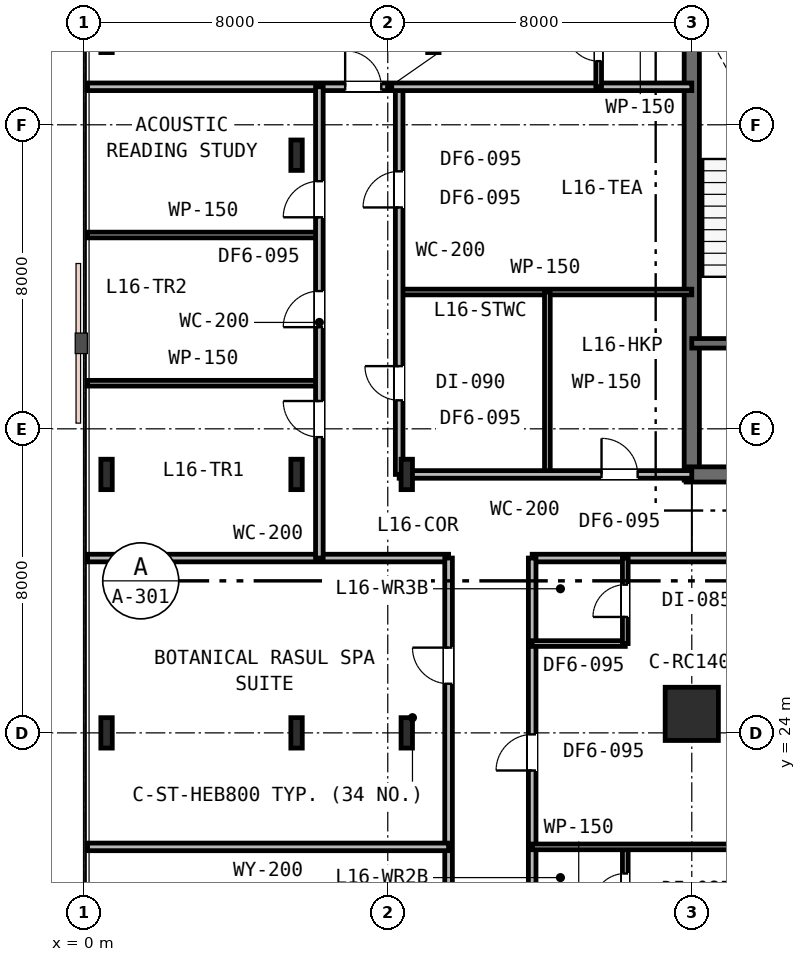
"""IFC4 building model, lengths in metres.
Left out: names, types, materials, properties, quantities, classifications, styles, units other than length and angle.
Written with IfcOpenShell. Run it as: python <this file> out.ifc"""

import sys

from ifc_helpers import new_model, si_unit, direction, frame, frame_2d, origin, origin_2d, place, context, subcontext, project, spatial, rectangle, i_section, extrude, element, fill, save


model = new_model("IFC4")
c1 = context("Model", 3, precision=1e-05, world=origin(), true_north=direction((0.0, 1.0)))
c2 = subcontext(c1, "Body", "Model", "MODEL_VIEW")
j1 = project(units=[si_unit("LENGTHUNIT", "METRE"), si_unit("PLANEANGLEUNIT", "RADIAN")], contexts=[c1])
p1 = place(None, origin())
s1 = spatial("IfcSite", under=j1, at=p1, CompositionType="ELEMENT")
p2 = place(p1, origin())
s2 = spatial("IfcBuilding", under=s1, at=p2, CompositionType="ELEMENT")
p3 = place(p2, frame((0.0, 0.0, 65.4)))
s3 = spatial("IfcBuildingStorey", under=s2, at=p3, CompositionType="ELEMENT", Elevation=65.4)
p4 = place(p3, frame((16.0, 30.65, 0.0), z_axis=(0.0, 0.0, 1.0), x_axis=(0.0, 1.0, 0.0)))
e1 = element("IfcWall", 1, at=p4, inside=s3, PredefinedType="SHEAR", context=c2, shape_type="SweptSolid", body=[
    extrude(rectangle(XDim=12.3, YDim=0.4, at=frame_2d((6.15, 0.0))), origin(), (0.0, 0.0, 1.0), 3.6),
])
p5 = place(p3, frame((15.85, 30.8, 0.0), z_axis=(0.0, 0.0, 1.0), x_axis=(1.0, 0.0, 0.0)))
e2 = element("IfcWall", 2, at=p5, inside=s3, PredefinedType="SHEAR", context=c2, shape_type="SweptSolid", body=[
    extrude(rectangle(XDim=11.2, YDim=0.4, at=frame_2d((5.6, 0.0))), origin(), (0.0, 0.0, 1.0), 3.6),
])
p6 = place(p5, frame((2.45, 0.0, 0.0)))
e3 = element("IfcOpeningElement", 3, at=p6, cuts=e2, PredefinedType="OPENING", context=c2, shape_type="SweptSolid", body=[
    extrude(rectangle(XDim=1.1, YDim=2.15, at=frame_2d((0.55, 1.075))), frame((0.0, 0.21, 0.0), z_axis=(0.0, -1.0, 0.0), x_axis=(1.0, 0.0, 0.0)), (0.0, 0.0, 1.0), 0.42),
])
p7 = place(p3, frame((16.0, 34.25, 0.0), z_axis=(0.0, 0.0, 1.0), x_axis=(1.0, 0.0, 0.0)))
e4 = element("IfcWall", 4, at=p7, inside=s3, PredefinedType="SHEAR", context=c2, shape_type="SweptSolid", body=[
    extrude(rectangle(XDim=6.05, YDim=0.25, at=frame_2d((3.025, 0.0))), origin(), (0.0, 0.0, 1.0), 3.6),
])
p8 = place(p7, frame((1.25, 0.0, 0.0)))
e5 = element("IfcOpeningElement", 5, at=p8, cuts=e4, PredefinedType="OPENING", context=c2, shape_type="SweptSolid", body=[
    extrude(rectangle(XDim=1.0, YDim=2.15, at=frame_2d((0.5, 1.075))), frame((0.0, 0.135, 0.0), z_axis=(0.0, -1.0, 0.0), x_axis=(1.0, 0.0, 0.0)), (0.0, 0.0, 1.0), 0.27),
])
p9 = place(p7, frame((4.2, 0.0, 0.0)))
e6 = element("IfcOpeningElement", 6, at=p9, cuts=e4, PredefinedType="OPENING", context=c2, shape_type="SweptSolid", body=[
    extrude(rectangle(XDim=1.1, YDim=2.15, at=frame_2d((0.55, 1.075))), frame((0.0, 0.135, 0.0), z_axis=(0.0, -1.0, 0.0), x_axis=(1.0, 0.0, 0.0)), (0.0, 0.0, 1.0), 0.27),
])
p10 = place(p3, frame((8.5, 24.0, 0.0), z_axis=(0.0, 0.0, 1.0), x_axis=(1.0, 0.0, 0.0)))
e7 = element("IfcColumn", 7, at=p10, inside=s3, PredefinedType="COLUMN", context=c2, shape_type="SweptSolid", body=[
    extrude(i_section(OverallWidth=0.3, OverallDepth=0.8, WebThickness=0.018, FlangeThickness=0.033, FilletRadius=0.03, at=origin_2d()), origin(), (0.0, 0.0, 1.0), 3.6),
])
p11 = place(p3, frame((16.0, 24.5, 0.0), z_axis=(0.0, 0.0, 1.0), x_axis=(1.0, 0.0, 0.0)))
e8 = element("IfcColumn", 8, at=p11, inside=s3, PredefinedType="COLUMN", context=c2, shape_type="SweptSolid", body=[
    extrude(rectangle(XDim=1.4, YDim=1.4, at=origin_2d()), origin(), (0.0, 0.0, 1.0), 3.6),
])
for number, where, z_axis, x_axis in (
    (9, (5.6, 24.0, 0.0), (0.0, 0.0, 1.0), (1.0, 0.0, 0.0)),
    (10, (5.6, 30.8, 0.0), (0.0, 0.0, 1.0), (1.0, 0.0, 0.0)),
    (11, (5.6, 39.2, 0.0), (0.0, 0.0, 1.0), (1.0, 0.0, 0.0)),
    (12, (8.5, 30.8, 0.0), (0.0, 0.0, 1.0), (1.0, 0.0, 0.0)),
    (13, (9.2, 42.3, 0.0), (0.0, 0.0, 1.0), (1.0, 0.0, 0.0)),
    (14, (0.6, 24.0, 0.0), (0.0, 0.0, 1.0), (1.0, 0.0, 0.0)),
    (15, (0.6, 30.8, 0.0), (0.0, 0.0, 1.0), (1.0, 0.0, 0.0)),
    (16, (0.6, 42.3, 0.0), (0.0, 0.0, 1.0), (1.0, 0.0, 0.0)),
):
    element("IfcColumn", number, at=place(p3, frame(where, z_axis=z_axis, x_axis=x_axis)), inside=s3, PredefinedType="COLUMN", context=c2, shape_type="SweptSolid", body=[
        extrude(i_section(OverallWidth=0.3, OverallDepth=0.8, WebThickness=0.018, FlangeThickness=0.033, FilletRadius=0.03, at=origin_2d()), origin(), (0.0, 0.0, 1.0), 3.6),
    ])
p12 = place(p3, frame((0.1, 28.6, 0.0), z_axis=(0.0, 0.0, 1.0), x_axis=(1.0, 0.0, 0.0)))
e17 = element("IfcWall", 17, at=p12, inside=s3, PredefinedType="PARTITIONING", context=c2, shape_type="SweptSolid", body=[
    extrude(rectangle(XDim=9.5, YDim=0.2, at=frame_2d((4.75, 0.0))), origin(), (0.0, 0.0, 1.0), 2.83),
])
p13 = place(p3, frame((11.8, 28.6, 0.0), z_axis=(0.0, 0.0, 1.0), x_axis=(1.0, 0.0, 0.0)))
e18 = element("IfcWall", 18, at=p13, inside=s3, PredefinedType="PARTITIONING", context=c2, shape_type="SweptSolid", body=[
    extrude(rectangle(XDim=38.6, YDim=0.2, at=frame_2d((19.3, 0.0))), origin(), (0.0, 0.0, 1.0), 2.83),
])
p14 = place(p13, frame((14.3, 0.0, 0.0)))
e19 = element("IfcOpeningElement", 19, at=p14, cuts=e18, PredefinedType="OPENING", context=c2, shape_type="SweptSolid", body=[
    extrude(rectangle(XDim=0.95, YDim=2.15, at=frame_2d((0.475, 1.075))), frame((0.0, 0.11, 0.0), z_axis=(0.0, -1.0, 0.0), x_axis=(1.0, 0.0, 0.0)), (0.0, 0.0, 1.0), 0.22),
])
p15 = place(p13, frame((22.075, 0.0, 0.0)))
e20 = element("IfcOpeningElement", 20, at=p15, cuts=e18, PredefinedType="OPENING", context=c2, shape_type="SweptSolid", body=[
    extrude(rectangle(XDim=0.95, YDim=2.15, at=frame_2d((0.475, 1.075))), frame((0.0, 0.11, 0.0), z_axis=(0.0, -1.0, 0.0), x_axis=(1.0, 0.0, 0.0)), (0.0, 0.0, 1.0), 0.22),
])
p16 = place(p13, frame((28.829, 0.0, 0.0)))
e21 = element("IfcOpeningElement", 21, at=p16, cuts=e18, PredefinedType="OPENING", context=c2, shape_type="SweptSolid", body=[
    extrude(rectangle(XDim=0.95, YDim=2.15, at=frame_2d((0.475, 1.075))), frame((0.0, 0.11, 0.0), z_axis=(0.0, -1.0, 0.0), x_axis=(1.0, 0.0, 0.0)), (0.0, 0.0, 1.0), 0.22),
])
p17 = place(p13, frame((34.669, 0.0, 0.0)))
e22 = element("IfcOpeningElement", 22, at=p17, cuts=e18, PredefinedType="OPENING", context=c2, shape_type="SweptSolid", body=[
    extrude(rectangle(XDim=0.95, YDim=2.15, at=frame_2d((0.475, 1.075))), frame((0.0, 0.11, 0.0), z_axis=(0.0, -1.0, 0.0), x_axis=(1.0, 0.0, 0.0)), (0.0, 0.0, 1.0), 0.22),
])
p18 = place(p3, frame((8.3, 35.6, 0.0), z_axis=(0.0, 0.0, 1.0), x_axis=(1.0, 0.0, 0.0)))
e23 = element("IfcWall", 23, at=p18, inside=s3, PredefinedType="PARTITIONING", context=c2, shape_type="SweptSolid", body=[
    extrude(rectangle(XDim=7.7, YDim=0.15, at=frame_2d((3.85, 0.0))), origin(), (0.0, 0.0, 1.0), 2.83),
])
p19 = place(p3, frame((12.2, 30.8, 0.0), z_axis=(0.0, 0.0, 1.0), x_axis=(0.0, 1.0, 0.0)))
e24 = element("IfcWall", 24, at=p19, inside=s3, PredefinedType="PARTITIONING", context=c2, shape_type="SweptSolid", body=[
    extrude(rectangle(XDim=4.8, YDim=0.15, at=frame_2d((2.4, 0.0))), origin(), (0.0, 0.0, 1.0), 2.83),
])
p20 = place(p3, frame((8.3, 30.8, 0.0), z_axis=(0.0, 0.0, 1.0), x_axis=(1.0, 0.0, 0.0)))
e25 = element("IfcWall", 25, at=p20, inside=s3, PredefinedType="PARTITIONING", context=c2, shape_type="SweptSolid", body=[
    extrude(rectangle(XDim=7.7, YDim=0.2, at=frame_2d((3.85, 0.0))), origin(), (0.0, 0.0, 1.0), 2.83),
])
p21 = place(p20, frame((5.325, 0.0, 0.0)))
e26 = element("IfcOpeningElement", 26, at=p21, cuts=e25, PredefinedType="OPENING", context=c2, shape_type="SweptSolid", body=[
    extrude(rectangle(XDim=0.95, YDim=2.15, at=frame_2d((0.475, 1.075))), frame((0.0, 0.11, 0.0), z_axis=(0.0, -1.0, 0.0), x_axis=(1.0, 0.0, 0.0)), (0.0, 0.0, 1.0), 0.22),
])
p22 = place(p3, frame((8.3, 30.8, 0.0), z_axis=(0.0, 0.0, 1.0), x_axis=(0.0, 1.0, 0.0)))
e27 = element("IfcWall", 27, at=p22, inside=s3, PredefinedType="PARTITIONING", context=c2, shape_type="SweptSolid", body=[
    extrude(rectangle(XDim=10.2, YDim=0.2, at=frame_2d((5.1, 0.0))), origin(), (0.0, 0.0, 1.0), 2.83),
])
p23 = place(p22, frame((1.95, 0.0, 0.0)))
e28 = element("IfcOpeningElement", 28, at=p23, cuts=e27, PredefinedType="OPENING", context=c2, shape_type="SweptSolid", body=[
    extrude(rectangle(XDim=0.9, YDim=2.15, at=frame_2d((0.45, 1.075))), frame((0.0, 0.11, 0.0), z_axis=(0.0, -1.0, 0.0), x_axis=(1.0, 0.0, 0.0)), (0.0, 0.0, 1.0), 0.22),
])
p24 = place(p22, frame((7.025, 0.0, 0.0)))
e29 = element("IfcOpeningElement", 29, at=p24, cuts=e27, PredefinedType="OPENING", context=c2, shape_type="SweptSolid", body=[
    extrude(rectangle(XDim=0.95, YDim=2.15, at=frame_2d((0.475, 1.075))), frame((0.0, 0.11, 0.0), z_axis=(0.0, -1.0, 0.0), x_axis=(1.0, 0.0, 0.0)), (0.0, 0.0, 1.0), 0.22),
])
p25 = place(p3, frame((0.1, 41.0, 0.0), z_axis=(0.0, 0.0, 1.0), x_axis=(1.0, 0.0, 0.0)))
e30 = element("IfcWall", 30, at=p25, inside=s3, PredefinedType="PARTITIONING", context=c2, shape_type="SweptSolid", body=[
    extrude(rectangle(XDim=15.9, YDim=0.2, at=frame_2d((7.95, 0.0))), origin(), (0.0, 0.0, 1.0), 2.83),
])
p26 = place(p25, frame((6.779, 0.0, 0.0)))
e31 = element("IfcOpeningElement", 31, at=p26, cuts=e30, PredefinedType="OPENING", context=c2, shape_type="SweptSolid", body=[
    extrude(rectangle(XDim=0.95, YDim=2.15, at=frame_2d((0.475, 1.075))), frame((0.0, 0.11, 0.0), z_axis=(0.0, -1.0, 0.0), x_axis=(1.0, 0.0, 0.0)), (0.0, 0.0, 1.0), 0.22),
])
p27 = place(p3, frame((13.55, 41.0, 0.0), z_axis=(0.0, 0.0, 1.0), x_axis=(0.0, 1.0, 0.0)))
e32 = element("IfcWall", 32, at=p27, inside=s3, PredefinedType="PARTITIONING", context=c2, shape_type="SweptSolid", body=[
    extrude(rectangle(XDim=2.2, YDim=0.15, at=frame_2d((1.1, 0.0))), origin(), (0.0, 0.0, 1.0), 3.33),
])
p28 = place(p27, frame((0.675, 0.0, 0.0)))
e33 = element("IfcOpeningElement", 33, at=p28, cuts=e32, PredefinedType="OPENING", context=c2, shape_type="SweptSolid", body=[
    extrude(rectangle(XDim=0.85, YDim=2.15, at=frame_2d((0.425, 1.075))), frame((0.0, 0.085, 0.0), z_axis=(0.0, -1.0, 0.0), x_axis=(1.0, 0.0, 0.0)), (0.0, 0.0, 1.0), 0.17),
])
for number, where, z_axis, x_axis in (
    (34, (0.1, 33.2, 0.0), (0.0, 0.0, 1.0), (1.0, 0.0, 0.0)),
    (35, (0.1, 37.1, 0.0), (0.0, 0.0, 1.0), (1.0, 0.0, 0.0)),
):
    element("IfcWall", number, at=place(p3, frame(where, z_axis=z_axis, x_axis=x_axis)), inside=s3, PredefinedType="PARTITIONING", context=c2, shape_type="SweptSolid", body=[
        extrude(rectangle(XDim=6.1, YDim=0.15, at=frame_2d((3.05, 0.0))), origin(), (0.0, 0.0, 1.0), 2.83),
    ])
p29 = place(p3, frame((6.2, 28.6, 0.0), z_axis=(0.0, 0.0, 1.0), x_axis=(0.0, 1.0, 0.0)))
e36 = element("IfcWall", 36, at=p29, inside=s3, PredefinedType="PARTITIONING", context=c2, shape_type="SweptSolid", body=[
    extrude(rectangle(XDim=12.4, YDim=0.2, at=frame_2d((6.2, 0.0))), origin(), (0.0, 0.0, 1.0), 2.83),
])
p30 = place(p29, frame((3.182, 0.0, 0.0)))
e37 = element("IfcOpeningElement", 37, at=p30, cuts=e36, PredefinedType="OPENING", context=c2, shape_type="SweptSolid", body=[
    extrude(rectangle(XDim=0.95, YDim=2.15, at=frame_2d((0.475, 1.075))), frame((0.0, 0.11, 0.0), z_axis=(0.0, -1.0, 0.0), x_axis=(1.0, 0.0, 0.0)), (0.0, 0.0, 1.0), 0.22),
])
p31 = place(p29, frame((6.075, 0.0, 0.0)))
e38 = element("IfcOpeningElement", 38, at=p31, cuts=e36, PredefinedType="OPENING", context=c2, shape_type="SweptSolid", body=[
    extrude(rectangle(XDim=0.95, YDim=2.15, at=frame_2d((0.475, 1.075))), frame((0.0, 0.11, 0.0), z_axis=(0.0, -1.0, 0.0), x_axis=(1.0, 0.0, 0.0)), (0.0, 0.0, 1.0), 0.22),
])
p32 = place(p29, frame((8.966, 0.0, 0.0)))
e39 = element("IfcOpeningElement", 39, at=p32, cuts=e36, PredefinedType="OPENING", context=c2, shape_type="SweptSolid", body=[
    extrude(rectangle(XDim=0.95, YDim=2.15, at=frame_2d((0.475, 1.075))), frame((0.0, 0.11, 0.0), z_axis=(0.0, -1.0, 0.0), x_axis=(1.0, 0.0, 0.0)), (0.0, 0.0, 1.0), 0.22),
])
p33 = place(p3, frame((9.6, 5.6, 0.0), z_axis=(0.0, 0.0, 1.0), x_axis=(0.0, 1.0, 0.0)))
e40 = element("IfcWall", 40, at=p33, inside=s3, PredefinedType="PARTITIONING", context=c2, shape_type="SweptSolid", body=[
    extrude(rectangle(XDim=23.0, YDim=0.2, at=frame_2d((11.5, 0.0))), origin(), (0.0, 0.0, 1.0), 2.83),
])
p34 = place(p33, frame((4.27, 0.0, 0.0)))
e41 = element("IfcOpeningElement", 41, at=p34, cuts=e40, PredefinedType="OPENING", context=c2, shape_type="SweptSolid", body=[
    extrude(rectangle(XDim=0.95, YDim=2.15, at=frame_2d((0.475, 1.075))), frame((0.0, 0.11, 0.0), z_axis=(0.0, -1.0, 0.0), x_axis=(1.0, 0.0, 0.0)), (0.0, 0.0, 1.0), 0.22),
])
p35 = place(p33, frame((10.17, 0.0, 0.0)))
e42 = element("IfcOpeningElement", 42, at=p35, cuts=e40, PredefinedType="OPENING", context=c2, shape_type="SweptSolid", body=[
    extrude(rectangle(XDim=0.95, YDim=2.15, at=frame_2d((0.475, 1.075))), frame((0.0, 0.11, 0.0), z_axis=(0.0, -1.0, 0.0), x_axis=(1.0, 0.0, 0.0)), (0.0, 0.0, 1.0), 0.22),
])
p36 = place(p33, frame((19.693, 0.0, 0.0)))
e43 = element("IfcOpeningElement", 43, at=p36, cuts=e40, PredefinedType="OPENING", context=c2, shape_type="SweptSolid", body=[
    extrude(rectangle(XDim=0.95, YDim=2.15, at=frame_2d((0.475, 1.075))), frame((0.0, 0.11, 0.0), z_axis=(0.0, -1.0, 0.0), x_axis=(1.0, 0.0, 0.0)), (0.0, 0.0, 1.0), 0.22),
])
p37 = place(p3, frame((11.8, 5.6, 0.0), z_axis=(0.0, 0.0, 1.0), x_axis=(0.0, 1.0, 0.0)))
e44 = element("IfcWall", 44, at=p37, inside=s3, PredefinedType="PARTITIONING", context=c2, shape_type="SweptSolid", body=[
    extrude(rectangle(XDim=23.0, YDim=0.2, at=frame_2d((11.5, 0.0))), origin(), (0.0, 0.0, 1.0), 2.83),
])
p38 = place(p37, frame((2.19, 0.0, 0.0)))
e45 = element("IfcOpeningElement", 45, at=p38, cuts=e44, PredefinedType="OPENING", context=c2, shape_type="SweptSolid", body=[
    extrude(rectangle(XDim=0.95, YDim=2.15, at=frame_2d((0.475, 1.075))), frame((0.0, 0.11, 0.0), z_axis=(0.0, -1.0, 0.0), x_axis=(1.0, 0.0, 0.0)), (0.0, 0.0, 1.0), 0.22),
])
p39 = place(p37, frame((9.92, 0.0, 0.0)))
e46 = element("IfcOpeningElement", 46, at=p39, cuts=e44, PredefinedType="OPENING", context=c2, shape_type="SweptSolid", body=[
    extrude(rectangle(XDim=0.95, YDim=2.15, at=frame_2d((0.475, 1.075))), frame((0.0, 0.11, 0.0), z_axis=(0.0, -1.0, 0.0), x_axis=(1.0, 0.0, 0.0)), (0.0, 0.0, 1.0), 0.22),
])
p40 = place(p37, frame((17.41, 0.0, 0.0)))
e47 = element("IfcOpeningElement", 47, at=p40, cuts=e44, PredefinedType="OPENING", context=c2, shape_type="SweptSolid", body=[
    extrude(rectangle(XDim=0.95, YDim=2.15, at=frame_2d((0.475, 1.075))), frame((0.0, 0.11, 0.0), z_axis=(0.0, -1.0, 0.0), x_axis=(1.0, 0.0, 0.0)), (0.0, 0.0, 1.0), 0.22),
])
p41 = place(p3, frame((14.25, 18.75, 0.0), z_axis=(0.0, 0.0, 1.0), x_axis=(0.0, 1.0, 0.0)))
e48 = element("IfcWall", 48, at=p41, inside=s3, PredefinedType="PARTITIONING", context=c2, shape_type="SweptSolid", body=[
    extrude(rectangle(XDim=2.25, YDim=0.15, at=frame_2d((1.125, 0.0))), origin(), (0.0, 0.0, 1.0), 3.33),
])
p42 = place(p41, frame((0.7, 0.0, 0.0)))
e49 = element("IfcOpeningElement", 49, at=p42, cuts=e48, PredefinedType="OPENING", context=c2, shape_type="SweptSolid", body=[
    extrude(rectangle(XDim=0.85, YDim=2.15, at=frame_2d((0.425, 1.075))), frame((0.0, 0.085, 0.0), z_axis=(0.0, -1.0, 0.0), x_axis=(1.0, 0.0, 0.0)), (0.0, 0.0, 1.0), 0.17),
])
p43 = place(p3, frame((11.8, 21.0, 0.0), z_axis=(0.0, 0.0, 1.0), x_axis=(1.0, 0.0, 0.0)))
e50 = element("IfcWall", 50, at=p43, inside=s3, PredefinedType="PARTITIONING", context=c2, shape_type="SweptSolid", body=[
    extrude(rectangle(XDim=12.1, YDim=0.15, at=frame_2d((6.05, 0.0))), origin(), (0.0, 0.0, 1.0), 2.83),
])
p44 = place(p3, frame((0.1, 21.0, 0.0), z_axis=(0.0, 0.0, 1.0), x_axis=(1.0, 0.0, 0.0)))
e51 = element("IfcWall", 51, at=p44, inside=s3, PredefinedType="PARTITIONING", context=c2, shape_type="SweptSolid", body=[
    extrude(rectangle(XDim=9.5, YDim=0.2, at=frame_2d((4.75, 0.0))), origin(), (0.0, 0.0, 1.0), 2.83),
])
p45 = place(p3, frame((11.8, 26.35, 0.0), z_axis=(0.0, 0.0, 1.0), x_axis=(1.0, 0.0, 0.0)))
e52 = element("IfcWall", 52, at=p45, inside=s3, PredefinedType="PARTITIONING", context=c2, shape_type="SweptSolid", body=[
    extrude(rectangle(XDim=2.45, YDim=0.15, at=frame_2d((1.225, 0.0))), origin(), (0.0, 0.0, 1.0), 3.33),
])
p46 = place(p3, frame((14.25, 26.35, 0.0), z_axis=(0.0, 0.0, 1.0), x_axis=(0.0, 1.0, 0.0)))
e53 = element("IfcWall", 53, at=p46, inside=s3, PredefinedType="PARTITIONING", context=c2, shape_type="SweptSolid", body=[
    extrude(rectangle(XDim=2.25, YDim=0.15, at=frame_2d((1.125, 0.0))), origin(), (0.0, 0.0, 1.0), 3.33),
])
p47 = place(p46, frame((0.7, 0.0, 0.0)))
e54 = element("IfcOpeningElement", 54, at=p47, cuts=e53, PredefinedType="OPENING", context=c2, shape_type="SweptSolid", body=[
    extrude(rectangle(XDim=0.85, YDim=2.15, at=frame_2d((0.425, 1.075))), frame((0.0, 0.085, 0.0), z_axis=(0.0, -1.0, 0.0), x_axis=(1.0, 0.0, 0.0)), (0.0, 0.0, 1.0), 0.17),
])
p48 = place(p21, origin())
e55 = element("IfcDoor", 55, at=p48, inside=s3, OperationType="SINGLE_SWING_LEFT", PredefinedType="DOOR", context=c2, shape_type="SweptSolid", body=[
    extrude(rectangle(XDim=0.95, YDim=2.15, at=frame_2d((0.475, 1.075))), frame((0.0, 0.025, 0.0), z_axis=(0.0, -1.0, 0.0), x_axis=(1.0, 0.0, 0.0)), (0.0, 0.0, 1.0), 0.05),
])
fill(e26, e55)
p49 = place(p23, origin())
e56 = element("IfcDoor", 56, at=p49, inside=s3, OperationType="SINGLE_SWING_RIGHT", PredefinedType="DOOR", context=c2, shape_type="SweptSolid", body=[
    extrude(rectangle(XDim=0.9, YDim=2.15, at=frame_2d((0.45, 1.075))), frame((0.0, 0.025, 0.0), z_axis=(0.0, -1.0, 0.0), x_axis=(1.0, 0.0, 0.0)), (0.0, 0.0, 1.0), 0.05),
])
fill(e28, e56)
p50 = place(p26, origin())
e57 = element("IfcDoor", 57, at=p50, inside=s3, OperationType="SINGLE_SWING_LEFT", PredefinedType="DOOR", context=c2, shape_type="SweptSolid", body=[
    extrude(rectangle(XDim=0.95, YDim=2.15, at=frame_2d((0.475, 1.075))), frame((0.0, 0.025, 0.0), z_axis=(0.0, -1.0, 0.0), x_axis=(1.0, 0.0, 0.0)), (0.0, 0.0, 1.0), 0.05),
])
fill(e31, e57)
p51 = place(p28, origin())
e58 = element("IfcDoor", 58, at=p51, inside=s3, OperationType="SINGLE_SWING_RIGHT", PredefinedType="DOOR", context=c2, shape_type="SweptSolid", body=[
    extrude(rectangle(XDim=0.85, YDim=2.15, at=frame_2d((0.425, 1.075))), frame((0.0, 0.025, 0.0), z_axis=(0.0, -1.0, 0.0), x_axis=(1.0, 0.0, 0.0)), (0.0, 0.0, 1.0), 0.05),
])
fill(e33, e58)
p52 = place(p30, origin())
e59 = element("IfcDoor", 59, at=p52, inside=s3, OperationType="SINGLE_SWING_RIGHT", PredefinedType="DOOR", context=c2, shape_type="SweptSolid", body=[
    extrude(rectangle(XDim=0.95, YDim=2.15, at=frame_2d((0.475, 1.075))), frame((0.0, 0.025, 0.0), z_axis=(0.0, -1.0, 0.0), x_axis=(1.0, 0.0, 0.0)), (0.0, 0.0, 1.0), 0.05),
])
fill(e37, e59)
p53 = place(p31, origin())
e60 = element("IfcDoor", 60, at=p53, inside=s3, OperationType="SINGLE_SWING_LEFT", PredefinedType="DOOR", context=c2, shape_type="SweptSolid", body=[
    extrude(rectangle(XDim=0.95, YDim=2.15, at=frame_2d((0.475, 1.075))), frame((0.0, 0.025, 0.0), z_axis=(0.0, -1.0, 0.0), x_axis=(1.0, 0.0, 0.0)), (0.0, 0.0, 1.0), 0.05),
])
fill(e38, e60)
p54 = place(p32, origin())
e61 = element("IfcDoor", 61, at=p54, inside=s3, OperationType="SINGLE_SWING_LEFT", PredefinedType="DOOR", context=c2, shape_type="SweptSolid", body=[
    extrude(rectangle(XDim=0.95, YDim=2.15, at=frame_2d((0.475, 1.075))), frame((0.0, 0.025, 0.0), z_axis=(0.0, -1.0, 0.0), x_axis=(1.0, 0.0, 0.0)), (0.0, 0.0, 1.0), 0.05),
])
fill(e39, e61)
p55 = place(p24, origin())
e62 = element("IfcDoor", 62, at=p55, inside=s3, OperationType="SINGLE_SWING_LEFT", PredefinedType="DOOR", context=c2, shape_type="SweptSolid", body=[
    extrude(rectangle(XDim=0.95, YDim=2.15, at=frame_2d((0.475, 1.075))), frame((0.0, 0.025, 0.0), z_axis=(0.0, -1.0, 0.0), x_axis=(1.0, 0.0, 0.0)), (0.0, 0.0, 1.0), 0.05),
])
fill(e29, e62)
p56 = place(p42, origin())
e63 = element("IfcDoor", 63, at=p56, inside=s3, OperationType="SINGLE_SWING_LEFT", PredefinedType="DOOR", context=c2, shape_type="SweptSolid", body=[
    extrude(rectangle(XDim=0.85, YDim=2.15, at=frame_2d((0.425, 1.075))), frame((0.0, 0.025, 0.0), z_axis=(0.0, -1.0, 0.0), x_axis=(1.0, 0.0, 0.0)), (0.0, 0.0, 1.0), 0.05),
])
fill(e49, e63)
p57 = place(p36, origin())
e64 = element("IfcDoor", 64, at=p57, inside=s3, OperationType="SINGLE_SWING_RIGHT", PredefinedType="DOOR", context=c2, shape_type="SweptSolid", body=[
    extrude(rectangle(XDim=0.95, YDim=2.15, at=frame_2d((0.475, 1.075))), frame((0.0, 0.025, 0.0), z_axis=(0.0, -1.0, 0.0), x_axis=(1.0, 0.0, 0.0)), (0.0, 0.0, 1.0), 0.05),
])
fill(e43, e64)
p58 = place(p40, origin())
e65 = element("IfcDoor", 65, at=p58, inside=s3, OperationType="SINGLE_SWING_LEFT", PredefinedType="DOOR", context=c2, shape_type="SweptSolid", body=[
    extrude(rectangle(XDim=0.95, YDim=2.15, at=frame_2d((0.475, 1.075))), frame((0.0, 0.025, 0.0), z_axis=(0.0, -1.0, 0.0), x_axis=(1.0, 0.0, 0.0)), (0.0, 0.0, 1.0), 0.05),
])
fill(e47, e65)
p59 = place(p47, origin())
e66 = element("IfcDoor", 66, at=p59, inside=s3, OperationType="SINGLE_SWING_LEFT", PredefinedType="DOOR", context=c2, shape_type="SweptSolid", body=[
    extrude(rectangle(XDim=0.85, YDim=2.15, at=frame_2d((0.425, 1.075))), frame((0.0, 0.025, 0.0), z_axis=(0.0, -1.0, 0.0), x_axis=(1.0, 0.0, 0.0)), (0.0, 0.0, 1.0), 0.05),
])
fill(e54, e66)
save(model, sys.argv[1])
